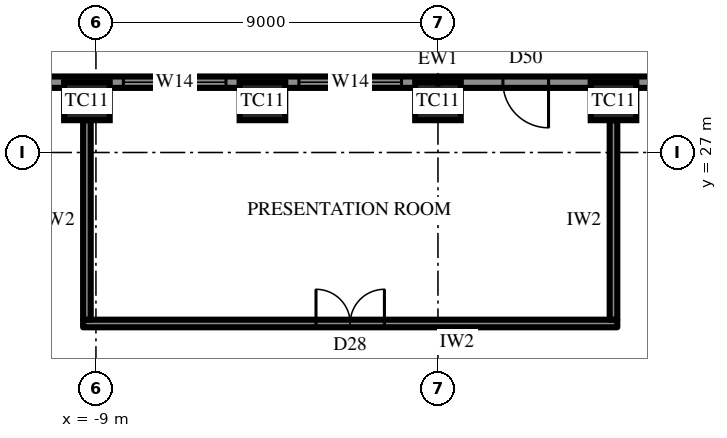
"""IFC4 building model, lengths in metres.
Left out: names, types, materials, properties, quantities, classifications, styles, units other than length and angle.
Written with IfcOpenShell. Run it as: python <this file> out.ifc"""

import sys

from ifc_helpers import new_model, si_unit, direction, frame, frame_2d, origin, origin_2d, place, context, subcontext, project, spatial, rectangle, extrude, element, fill, save


model = new_model("IFC4")
c1 = context("Model", 3, precision=1e-05, world=origin(), true_north=direction((0.0, 1.0)))
c2 = subcontext(c1, "Body", "Model", "MODEL_VIEW")
j1 = project(units=[si_unit("LENGTHUNIT", "METRE"), si_unit("PLANEANGLEUNIT", "RADIAN")], contexts=[c1])
p1 = place(None, origin())
s1 = spatial("IfcSite", under=j1, at=p1, CompositionType="ELEMENT")
p2 = place(p1, origin())
s2 = spatial("IfcBuilding", under=s1, at=p2, CompositionType="ELEMENT")
p3 = place(p2, frame((0.0, 0.0, 270.1)))
s3 = spatial("IfcBuildingStorey", under=s2, at=p3, CompositionType="ELEMENT", Elevation=270.1)
for number, where, z_axis, x_axis in (
    (1, (4.619, 28.35, 0.0), (0.0, 0.0, 1.0), (-1.0, 0.0, 0.0)),
    (2, (0.0, 28.35, 0.0), (0.0, 0.0, 1.0), (-1.0, 0.0, 0.0)),
    (3, (-4.619, 28.35, 0.0), (0.0, 0.0, 1.0), (-1.0, 0.0, 0.0)),
    (4, (-9.238, 28.35, 0.0), (0.0, 0.0, 1.0), (-1.0, 0.0, 0.0)),
):
    element("IfcColumn", number, at=place(p3, frame(where, z_axis=z_axis, x_axis=x_axis)), inside=s3, PredefinedType="COLUMN", context=c2, shape_type="SweptSolid", body=[
        extrude(rectangle(XDim=1.2, YDim=1.0, at=origin_2d()), origin(), (0.0, 0.0, 1.0), 4.2),
    ])
p4 = place(p3, frame((12.556, 28.85, 0.0), z_axis=(0.0, 0.0, 1.0), x_axis=(-1.0, 0.0, 0.0)))
e5 = element("IfcWall", 5, at=p4, inside=s3, PredefinedType="SOLIDWALL", context=c2, shape_type="SweptSolid", body=[
    extrude(rectangle(XDim=25.113, YDim=0.3, at=frame_2d((12.556, 0.0))), origin(), (0.0, 0.0, 1.0), 2.8),
])
p5 = place(p4, frame((4.278, 0.0, 0.6)))
e6 = element("IfcOpeningElement", 6, at=p5, cuts=e5, PredefinedType="OPENING", context=c2, shape_type="SweptSolid", body=[
    extrude(rectangle(XDim=2.7, YDim=1.95, at=frame_2d((1.35, 0.975))), frame((0.0, 0.16, 0.0), z_axis=(0.0, -1.0, 0.0), x_axis=(1.0, 0.0, 0.0)), (0.0, 0.0, 1.0), 0.32),
])
p6 = place(p4, frame((9.647, 0.0, 0.0)))
e7 = element("IfcOpeningElement", 7, at=p6, cuts=e5, PredefinedType="OPENING", context=c2, shape_type="SweptSolid", body=[
    extrude(rectangle(XDim=1.2, YDim=2.4, at=frame_2d((0.6, 1.2))), frame((0.0, 0.16, 0.0), z_axis=(0.0, -1.0, 0.0), x_axis=(1.0, 0.0, 0.0)), (0.0, 0.0, 1.0), 0.32),
])
p7 = place(p4, frame((13.516, 0.0, 0.6)))
e8 = element("IfcOpeningElement", 8, at=p7, cuts=e5, PredefinedType="OPENING", context=c2, shape_type="SweptSolid", body=[
    extrude(rectangle(XDim=2.7, YDim=1.95, at=frame_2d((1.35, 0.975))), frame((0.0, 0.16, 0.0), z_axis=(0.0, -1.0, 0.0), x_axis=(1.0, 0.0, 0.0)), (0.0, 0.0, 1.0), 0.32),
])
p8 = place(p4, frame((18.135, 0.0, 0.6)))
e9 = element("IfcOpeningElement", 9, at=p8, cuts=e5, PredefinedType="OPENING", context=c2, shape_type="SweptSolid", body=[
    extrude(rectangle(XDim=2.7, YDim=1.95, at=frame_2d((1.35, 0.975))), frame((0.0, 0.16, 0.0), z_axis=(0.0, -1.0, 0.0), x_axis=(1.0, 0.0, 0.0)), (0.0, 0.0, 1.0), 0.32),
])
p9 = place(p3, frame((4.719, 22.5, 0.0), z_axis=(0.0, 0.0, 1.0), x_axis=(-1.0, 0.0, 0.0)))
e10 = element("IfcWall", 10, at=p9, inside=s3, PredefinedType="PARTITIONING", context=c2, shape_type="SweptSolid", body=[
    extrude(rectangle(XDim=14.056, YDim=0.2, at=frame_2d((7.028, 0.0))), origin(), (0.0, 0.0, 1.0), 4.0),
])
p10 = place(p9, frame((6.128, 0.0, 0.0)))
e11 = element("IfcOpeningElement", 11, at=p10, cuts=e10, PredefinedType="OPENING", context=c2, shape_type="SweptSolid", body=[
    extrude(rectangle(XDim=1.8, YDim=2.4, at=frame_2d((0.9, 1.2))), frame((0.0, 0.11, 0.0), z_axis=(0.0, -1.0, 0.0), x_axis=(1.0, 0.0, 0.0)), (0.0, 0.0, 1.0), 0.22),
])
for number, where, z_axis, x_axis in (
    (12, (4.619, 22.6, 0.0), (0.0, 0.0, 1.0), (0.0, 1.0, 0.0)),
    (13, (-9.238, 22.6, 0.0), (0.0, 0.0, 1.0), (0.0, 1.0, 0.0)),
):
    element("IfcWall", number, at=place(p3, frame(where, z_axis=z_axis, x_axis=x_axis)), inside=s3, PredefinedType="PARTITIONING", context=c2, shape_type="SweptSolid", body=[
        extrude(rectangle(XDim=5.25, YDim=0.2, at=frame_2d((2.625, 0.0))), origin(), (0.0, 0.0, 1.0), 2.992),
    ])
p11 = place(p6, origin())
e14 = element("IfcDoor", 14, at=p11, inside=s3, OperationType="SINGLE_SWING_RIGHT", PredefinedType="DOOR", context=c2, shape_type="SweptSolid", body=[
    extrude(rectangle(XDim=1.2, YDim=2.4, at=frame_2d((0.6, 1.2))), frame((0.0, 0.025, 0.0), z_axis=(0.0, -1.0, 0.0), x_axis=(1.0, 0.0, 0.0)), (0.0, 0.0, 1.0), 0.05),
])
fill(e7, e14)
p12 = place(p7, origin())
e15 = element("IfcWindow", 15, at=p12, inside=s3, PartitioningType="SINGLE_PANEL", PredefinedType="WINDOW", context=c2, shape_type="SweptSolid", body=[
    extrude(rectangle(XDim=2.7, YDim=1.95, at=frame_2d((1.35, 0.975))), frame((0.0, 0.03, 0.0), z_axis=(0.0, -1.0, 0.0), x_axis=(1.0, 0.0, 0.0)), (0.0, 0.0, 1.0), 0.06),
])
fill(e8, e15)
p13 = place(p8, origin())
e16 = element("IfcWindow", 16, at=p13, inside=s3, PartitioningType="SINGLE_PANEL", PredefinedType="WINDOW", context=c2, shape_type="SweptSolid", body=[
    extrude(rectangle(XDim=2.7, YDim=1.95, at=frame_2d((1.35, 0.975))), frame((0.0, 0.03, 0.0), z_axis=(0.0, -1.0, 0.0), x_axis=(1.0, 0.0, 0.0)), (0.0, 0.0, 1.0), 0.06),
])
fill(e9, e16)
p14 = place(p10, frame((1.8, 0.0, 0.0), z_axis=(0.0, 0.0, 1.0), x_axis=(-1.0, 0.0, 0.0)))
e17 = element("IfcDoor", 17, at=p14, inside=s3, OperationType="DOUBLE_DOOR_SINGLE_SWING", PredefinedType="DOOR", context=c2, shape_type="SweptSolid", body=[
    extrude(rectangle(XDim=1.8, YDim=2.4, at=frame_2d((0.9, 1.2))), frame((0.0, 0.025, 0.0), z_axis=(0.0, -1.0, 0.0), x_axis=(1.0, 0.0, 0.0)), (0.0, 0.0, 1.0), 0.05),
])
fill(e11, e17)
save(model, sys.argv[1])
